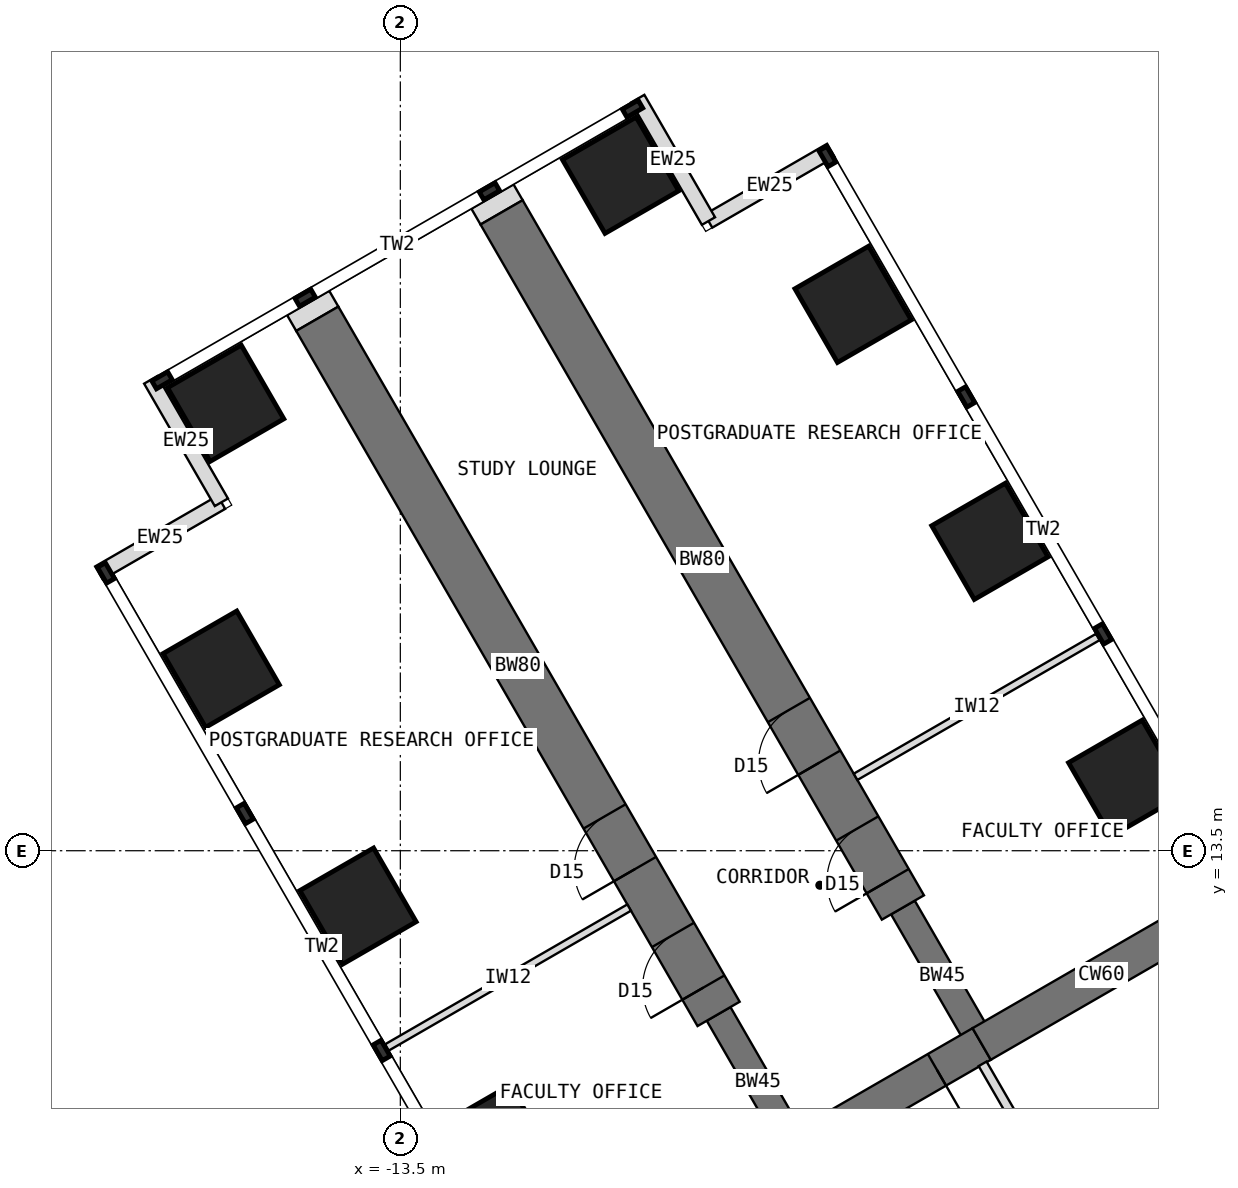
"""IFC4 building model, lengths in metres.
Left out: names, types, materials, properties, quantities, classifications, styles, units other than length and angle.
Written with IfcOpenShell. Run it as: python <this file> out.ifc"""

import sys

from ifc_helpers import new_model, si_unit, direction, frame, frame_2d, origin, origin_2d, place, context, subcontext, project, spatial, rectangle, extrude, element, fill, save


model = new_model("IFC4")
c1 = context("Model", 3, precision=1e-05, world=origin(), true_north=direction((0.0, 1.0)))
c2 = subcontext(c1, "Body", "Model", "MODEL_VIEW")
j1 = project(units=[si_unit("LENGTHUNIT", "METRE"), si_unit("PLANEANGLEUNIT", "RADIAN")], contexts=[c1])
p1 = place(None, origin())
s1 = spatial("IfcSite", under=j1, at=p1, CompositionType="ELEMENT")
p2 = place(p1, origin())
s2 = spatial("IfcBuilding", under=s1, at=p2, CompositionType="ELEMENT")
p3 = place(p2, frame((0.0, 0.0, 97.5)))
s3 = spatial("IfcBuildingStorey", under=s2, at=p3, CompositionType="ELEMENT", Elevation=97.5)
p4 = place(p3, frame((0.0, 12.596, 0.0), z_axis=(0.0, 0.0, 1.0), x_axis=(-0.866011268655, -0.500024481964, 0.0)))
e1 = element("IfcWall", 1, at=p4, inside=s3, PredefinedType="SHEAR", context=c2, shape_type="SweptSolid", body=[
    extrude(rectangle(XDim=4.548, YDim=0.6, at=frame_2d((2.274, 0.0))), origin(), (0.0, 0.0, 1.0), 4.0),
])
p5 = place(p3, frame((-3.939, 10.322, 0.0), z_axis=(0.0, 0.0, 1.0), x_axis=(-0.866019471182, -0.500010275428, 0.0)))
e2 = element("IfcWall", 2, at=p5, inside=s3, PredefinedType="SHEAR", context=c2, shape_type="SweptSolid", body=[
    extrude(rectangle(XDim=3.5, YDim=0.6, at=frame_2d((1.75, 0.0))), origin(), (0.0, 0.0, 1.0), 4.0),
])
p6 = place(p5, frame((0.85, 0.0, 0.0)))
e3 = element("IfcOpeningElement", 3, at=p6, cuts=e2, PredefinedType="OPENING", context=c2, shape_type="SweptSolid", body=[
    extrude(rectangle(XDim=1.8, YDim=2.1, at=frame_2d((0.9, 1.05))), frame((0.0, 0.31, 0.0), z_axis=(0.0, -1.0, 0.0), x_axis=(1.0, 0.0, 0.0)), (0.0, 0.0, 1.0), 0.62),
])
p7 = place(p3, frame((-6.97, 8.572, 0.0), z_axis=(0.0, 0.0, 1.0), x_axis=(-0.499988811324, 0.866031863473, 0.0)))
e4 = element("IfcWall", 4, at=p7, inside=s3, PredefinedType="SHEAR", context=c2, shape_type="SweptSolid", body=[
    extrude(rectangle(XDim=2.592, YDim=0.45, at=frame_2d((1.296, 0.0))), origin(), (0.0, 0.0, 1.0), 4.0),
])
p8 = place(p3, frame((-8.266, 10.816, 0.0), z_axis=(0.0, 0.0, 1.0), x_axis=(-0.499996231654, 0.866027579429, 0.0)))
e5 = element("IfcWall", 5, at=p8, inside=s3, PredefinedType="SHEAR", context=c2, shape_type="SweptSolid", body=[
    extrude(rectangle(XDim=13.2, YDim=0.8, at=frame_2d((6.6, 0.0))), origin(), (0.0, 0.0, 1.0), 4.0),
])
p9 = place(p8, frame((0.5, 0.0, 0.0)))
e6 = element("IfcOpeningElement", 6, at=p9, cuts=e5, PredefinedType="OPENING", context=c2, shape_type="SweptSolid", body=[
    extrude(rectangle(XDim=1.0, YDim=2.1, at=frame_2d((0.5, 1.05))), frame((0.0, 0.41, 0.0), z_axis=(0.0, -1.0, 0.0), x_axis=(1.0, 0.0, 0.0)), (0.0, 0.0, 1.0), 0.82),
])
p10 = place(p8, frame((2.75, 0.0, 0.0)))
e7 = element("IfcOpeningElement", 7, at=p10, cuts=e5, PredefinedType="OPENING", context=c2, shape_type="SweptSolid", body=[
    extrude(rectangle(XDim=1.0, YDim=2.1, at=frame_2d((0.5, 1.05))), frame((0.0, 0.41, 0.0), z_axis=(0.0, -1.0, 0.0), x_axis=(1.0, 0.0, 0.0)), (0.0, 0.0, 1.0), 0.82),
])
p11 = place(p3, frame((-3.939, 10.322, 0.0), z_axis=(0.0, 0.0, 1.0), x_axis=(-0.499918158782, 0.866072649678, 0.0)))
e8 = element("IfcWall", 8, at=p11, inside=s3, PredefinedType="SHEAR", context=c2, shape_type="SweptSolid", body=[
    extrude(rectangle(XDim=2.592, YDim=0.45, at=frame_2d((1.296, 0.0))), origin(), (0.0, 0.0, 1.0), 4.0),
])
p12 = place(p3, frame((-5.234, 12.566, 0.0), z_axis=(0.0, 0.0, 1.0), x_axis=(-0.500010103361, 0.866019570528, 0.0)))
e9 = element("IfcWall", 9, at=p12, inside=s3, PredefinedType="SHEAR", context=c2, shape_type="SweptSolid", body=[
    extrude(rectangle(XDim=13.2, YDim=0.8, at=frame_2d((6.6, 0.0))), origin(), (0.0, 0.0, 1.0), 4.0),
])
p13 = place(p12, frame((0.5, 0.0, 0.0)))
e10 = element("IfcOpeningElement", 10, at=p13, cuts=e9, PredefinedType="OPENING", context=c2, shape_type="SweptSolid", body=[
    extrude(rectangle(XDim=1.0, YDim=2.1, at=frame_2d((0.5, 1.05))), frame((0.0, 0.41, 0.0), z_axis=(0.0, -1.0, 0.0), x_axis=(1.0, 0.0, 0.0)), (0.0, 0.0, 1.0), 0.82),
])
p14 = place(p12, frame((2.75, 0.0, 0.0)))
e11 = element("IfcOpeningElement", 11, at=p14, cuts=e9, PredefinedType="OPENING", context=c2, shape_type="SweptSolid", body=[
    extrude(rectangle(XDim=1.0, YDim=2.1, at=frame_2d((0.5, 1.05))), frame((0.0, 0.41, 0.0), z_axis=(0.0, -1.0, 0.0), x_axis=(1.0, 0.0, 0.0)), (0.0, 0.0, 1.0), 0.82),
])
for number, where, z_axis, x_axis in (
    (12, (-11.946, 8.691, 0.0), (0.0, 0.0, 1.0), (0.866, 0.5, 0.0)),
    (13, (-1.554, 14.691, 0.0), (0.0, 0.0, 1.0), (0.866, 0.5, 0.0)),
    (14, (-14.196, 12.588, 0.0), (0.0, 0.0, 1.0), (0.866, 0.5, 0.0)),
    (15, (-3.804, 18.588, 0.0), (0.0, 0.0, 1.0), (0.866, 0.5, 0.0)),
    (16, (-16.446, 16.486, 0.0), (0.0, 0.0, 1.0), (0.866, 0.5, 0.0)),
    (17, (-6.054, 22.486, 0.0), (0.0, 0.0, 1.0), (0.866, 0.5, 0.0)),
    (18, (-16.373, 20.858, 0.0), (0.0, 0.0, 1.0), (0.866, 0.5, 0.0)),
    (19, (-9.877, 24.608, 0.0), (0.0, 0.0, 1.0), (0.866, 0.5, 0.0)),
):
    element("IfcColumn", number, at=place(p3, frame(where, z_axis=z_axis, x_axis=x_axis)), inside=s3, PredefinedType="COLUMN", context=c2, shape_type="SweptSolid", body=[
        extrude(rectangle(XDim=1.4, YDim=1.4, at=origin_2d()), origin(), (0.0, 0.0, 1.0), 4.0),
    ])
for number, where, z_axis, x_axis in (
    (20, (-18.456, 18.067, 0.0), (0.0, 0.0, 1.0), (0.866, 0.5, 0.0)),
    (21, (-16.443, 19.23, 0.0), (0.0, 0.0, 1.0), (-0.5, 0.866, 0.0)),
    (22, (-6.419, 25.017, 0.0), (0.0, 0.0, 1.0), (-0.866, -0.5, 0.0)),
    (23, (-8.432, 23.855, 0.0), (0.0, 0.0, 1.0), (-0.5, 0.866, 0.0)),
):
    element("IfcWall", number, at=place(p3, frame(where, z_axis=z_axis, x_axis=x_axis)), inside=s3, PredefinedType="STANDARD", context=c2, shape_type="SweptSolid", body=[
        extrude(rectangle(XDim=2.325, YDim=0.25, at=frame_2d((1.163, 0.0))), origin(), (0.0, 0.0, 1.0), 3.8),
    ])
p15 = place(p3, frame((-14.865, 22.248, 0.0), z_axis=(0.0, 0.0, 1.0), x_axis=(-0.500426713919, 0.865778900179, 0.0)))
e24 = element("IfcWall", 24, at=p15, inside=s3, PredefinedType="PARTITIONING", context=c2, shape_type="SweptSolid", body=[
    extrude(rectangle(XDim=0.3, YDim=0.8, at=frame_2d((0.15, 0.0))), origin(), (0.0, 0.0, 1.0), 3.8),
])
p16 = place(p3, frame((-11.834, 23.998, 0.0), z_axis=(0.0, 0.0, 1.0), x_axis=(-0.499816412211, 0.866131372301, 0.0)))
e25 = element("IfcWall", 25, at=p16, inside=s3, PredefinedType="PARTITIONING", context=c2, shape_type="SweptSolid", body=[
    extrude(rectangle(XDim=0.3, YDim=0.8, at=frame_2d((0.15, 0.0))), origin(), (0.0, 0.0, 1.0), 3.8),
])
p17 = place(p3, frame((-1.201, 6.12, 0.0), z_axis=(0.0, 0.0, 1.0), x_axis=(0.49999668571, 0.866027317282, 0.0)))
e26 = element("IfcWall", 26, at=p17, inside=s3, PredefinedType="SHEAR", context=c2, shape_type="SweptSolid", body=[
    extrude(rectangle(XDim=5.908, YDim=0.4, at=frame_2d((2.954, 0.0))), origin(), (0.0, 0.0, 1.0), 4.0),
])
for number, where, z_axis, x_axis in (
    (27, (-9.737, 12.565, 0.0), (0.0, 0.0, 1.0), (-0.866, -0.5, 0.0)),
    (28, (-6.013, 14.715, 0.0), (0.0, 0.0, 1.0), (0.866, 0.5, 0.0)),
):
    element("IfcWall", number, at=place(p3, frame(where, z_axis=z_axis, x_axis=x_axis)), inside=s3, PredefinedType="PARTITIONING", context=c2, shape_type="SweptSolid", body=[
        extrude(rectangle(XDim=4.6, YDim=0.12, at=frame_2d((2.3, 0.0))), origin(), (0.0, 0.0, 1.0), 3.8),
    ])
p18 = place(p3, frame((-3.924, 9.996, 0.0), z_axis=(0.0, 0.0, 1.0), x_axis=(0.500050086259, -0.865996484538, 0.0)))
e29 = element("IfcWall", 29, at=p18, inside=s3, PredefinedType="PARTITIONING", context=c2, shape_type="SweptSolid", body=[
    extrude(rectangle(XDim=5.096, YDim=0.15, at=frame_2d((2.548, 0.0))), origin(), (0.0, 0.0, 1.0), 3.8),
])
p19 = place(p18, frame((3.053, 0.0, 0.0)))
e30 = element("IfcOpeningElement", 30, at=p19, cuts=e29, PredefinedType="OPENING", context=c2, shape_type="SweptSolid", body=[
    extrude(rectangle(XDim=1.0, YDim=2.1, at=frame_2d((0.5, 1.05))), frame((0.0, 0.085, 0.0), z_axis=(0.0, -1.0, 0.0), x_axis=(1.0, 0.0, 0.0)), (0.0, 0.0, 1.0), 0.17),
])
p20 = place(p6, origin())
e31 = element("IfcDoor", 31, at=p20, inside=s3, OperationType="DOUBLE_DOOR_DOUBLE_SWING", PredefinedType="DOOR", context=c2, shape_type="SweptSolid", body=[
    extrude(rectangle(XDim=1.72, YDim=2.06, at=frame_2d((0.9, 1.03))), frame((0.0, 0.025, 0.0), z_axis=(0.0, -1.0, 0.0), x_axis=(1.0, 0.0, 0.0)), (0.0, 0.0, 1.0), 0.05),
    extrude(rectangle(XDim=0.04, YDim=2.1, at=frame_2d((0.02, 1.05))), frame((0.0, 0.3, 0.0), z_axis=(0.0, -1.0, 0.0), x_axis=(1.0, 0.0, 0.0)), (0.0, 0.0, 1.0), 0.6),
    extrude(rectangle(XDim=0.04, YDim=2.1, at=frame_2d((1.78, 1.05))), frame((0.0, 0.3, 0.0), z_axis=(0.0, -1.0, 0.0), x_axis=(1.0, 0.0, 0.0)), (0.0, 0.0, 1.0), 0.6),
    extrude(rectangle(XDim=1.72, YDim=0.04, at=frame_2d((0.9, 2.08))), frame((0.0, 0.3, 0.0), z_axis=(0.0, -1.0, 0.0), x_axis=(1.0, 0.0, 0.0)), (0.0, 0.0, 1.0), 0.6),
])
fill(e3, e31)
p21 = place(p9, origin())
e32 = element("IfcDoor", 32, at=p21, inside=s3, OperationType="SINGLE_SWING_LEFT", PredefinedType="DOOR", context=c2, shape_type="SweptSolid", body=[
    extrude(rectangle(XDim=0.92, YDim=2.06, at=frame_2d((0.5, 1.03))), frame((0.0, 0.025, 0.0), z_axis=(0.0, -1.0, 0.0), x_axis=(1.0, 0.0, 0.0)), (0.0, 0.0, 1.0), 0.05),
    extrude(rectangle(XDim=0.04, YDim=2.1, at=frame_2d((0.02, 1.05))), frame((0.0, 0.4, 0.0), z_axis=(0.0, -1.0, 0.0), x_axis=(1.0, 0.0, 0.0)), (0.0, 0.0, 1.0), 0.8),
    extrude(rectangle(XDim=0.04, YDim=2.1, at=frame_2d((0.98, 1.05))), frame((0.0, 0.4, 0.0), z_axis=(0.0, -1.0, 0.0), x_axis=(1.0, 0.0, 0.0)), (0.0, 0.0, 1.0), 0.8),
    extrude(rectangle(XDim=0.92, YDim=0.04, at=frame_2d((0.5, 2.08))), frame((0.0, 0.4, 0.0), z_axis=(0.0, -1.0, 0.0), x_axis=(1.0, 0.0, 0.0)), (0.0, 0.0, 1.0), 0.8),
])
fill(e6, e32)
p22 = place(p10, origin())
e33 = element("IfcDoor", 33, at=p22, inside=s3, OperationType="SINGLE_SWING_LEFT", PredefinedType="DOOR", context=c2, shape_type="SweptSolid", body=[
    extrude(rectangle(XDim=0.92, YDim=2.06, at=frame_2d((0.5, 1.03))), frame((0.0, 0.025, 0.0), z_axis=(0.0, -1.0, 0.0), x_axis=(1.0, 0.0, 0.0)), (0.0, 0.0, 1.0), 0.05),
    extrude(rectangle(XDim=0.04, YDim=2.1, at=frame_2d((0.02, 1.05))), frame((0.0, 0.4, 0.0), z_axis=(0.0, -1.0, 0.0), x_axis=(1.0, 0.0, 0.0)), (0.0, 0.0, 1.0), 0.8),
    extrude(rectangle(XDim=0.04, YDim=2.1, at=frame_2d((0.98, 1.05))), frame((0.0, 0.4, 0.0), z_axis=(0.0, -1.0, 0.0), x_axis=(1.0, 0.0, 0.0)), (0.0, 0.0, 1.0), 0.8),
    extrude(rectangle(XDim=0.92, YDim=0.04, at=frame_2d((0.5, 2.08))), frame((0.0, 0.4, 0.0), z_axis=(0.0, -1.0, 0.0), x_axis=(1.0, 0.0, 0.0)), (0.0, 0.0, 1.0), 0.8),
])
fill(e7, e33)
p23 = place(p13, origin())
e34 = element("IfcDoor", 34, at=p23, inside=s3, OperationType="SINGLE_SWING_LEFT", PredefinedType="DOOR", context=c2, shape_type="SweptSolid", body=[
    extrude(rectangle(XDim=0.92, YDim=2.06, at=frame_2d((0.5, 1.03))), frame((0.0, 0.025, 0.0), z_axis=(0.0, -1.0, 0.0), x_axis=(1.0, 0.0, 0.0)), (0.0, 0.0, 1.0), 0.05),
    extrude(rectangle(XDim=0.04, YDim=2.1, at=frame_2d((0.02, 1.05))), frame((0.0, 0.4, 0.0), z_axis=(0.0, -1.0, 0.0), x_axis=(1.0, 0.0, 0.0)), (0.0, 0.0, 1.0), 0.8),
    extrude(rectangle(XDim=0.04, YDim=2.1, at=frame_2d((0.98, 1.05))), frame((0.0, 0.4, 0.0), z_axis=(0.0, -1.0, 0.0), x_axis=(1.0, 0.0, 0.0)), (0.0, 0.0, 1.0), 0.8),
    extrude(rectangle(XDim=0.92, YDim=0.04, at=frame_2d((0.5, 2.08))), frame((0.0, 0.4, 0.0), z_axis=(0.0, -1.0, 0.0), x_axis=(1.0, 0.0, 0.0)), (0.0, 0.0, 1.0), 0.8),
])
fill(e10, e34)
p24 = place(p14, origin())
e35 = element("IfcDoor", 35, at=p24, inside=s3, OperationType="SINGLE_SWING_LEFT", PredefinedType="DOOR", context=c2, shape_type="SweptSolid", body=[
    extrude(rectangle(XDim=0.92, YDim=2.06, at=frame_2d((0.5, 1.03))), frame((0.0, 0.025, 0.0), z_axis=(0.0, -1.0, 0.0), x_axis=(1.0, 0.0, 0.0)), (0.0, 0.0, 1.0), 0.05),
    extrude(rectangle(XDim=0.04, YDim=2.1, at=frame_2d((0.02, 1.05))), frame((0.0, 0.4, 0.0), z_axis=(0.0, -1.0, 0.0), x_axis=(1.0, 0.0, 0.0)), (0.0, 0.0, 1.0), 0.8),
    extrude(rectangle(XDim=0.04, YDim=2.1, at=frame_2d((0.98, 1.05))), frame((0.0, 0.4, 0.0), z_axis=(0.0, -1.0, 0.0), x_axis=(1.0, 0.0, 0.0)), (0.0, 0.0, 1.0), 0.8),
    extrude(rectangle(XDim=0.92, YDim=0.04, at=frame_2d((0.5, 2.08))), frame((0.0, 0.4, 0.0), z_axis=(0.0, -1.0, 0.0), x_axis=(1.0, 0.0, 0.0)), (0.0, 0.0, 1.0), 0.8),
])
fill(e11, e35)
save(model, sys.argv[1])
